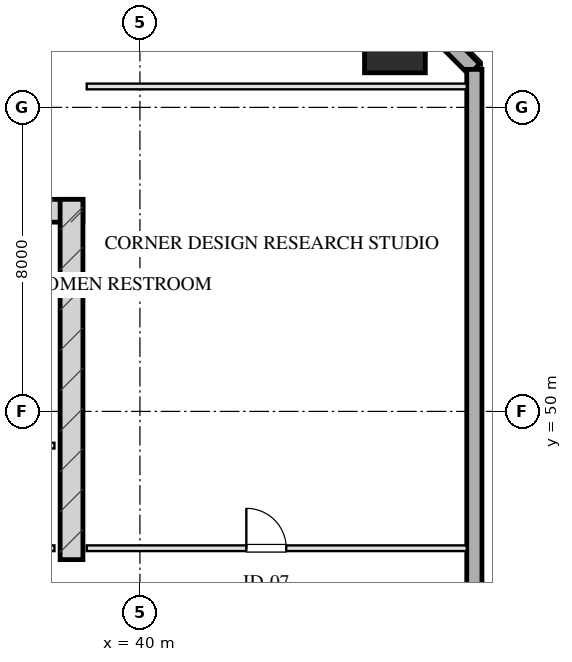
"""IFC4 building model, lengths in metres.
Left out: names, types, materials, properties, quantities, classifications, styles, units other than length and angle.
Written with IfcOpenShell. Run it as: python <this file> out.ifc"""

import sys

from ifc_helpers import new_model, si_unit, direction, frame, frame_2d, origin, origin_2d, place, context, subcontext, project, spatial, rectangle, hollow_rectangle, extrude, element, fill, save


model = new_model("IFC4")
c1 = context("Model", 3, precision=1e-05, world=origin(), true_north=direction((0.0, 1.0)))
c2 = subcontext(c1, "Body", "Model", "MODEL_VIEW")
j1 = project(units=[si_unit("LENGTHUNIT", "METRE"), si_unit("PLANEANGLEUNIT", "RADIAN")], contexts=[c1])
p1 = place(None, origin())
s1 = spatial("IfcSite", under=j1, at=p1, CompositionType="ELEMENT")
p2 = place(p1, origin())
s2 = spatial("IfcBuilding", under=s1, at=p2, CompositionType="ELEMENT")
p3 = place(p2, frame((0.0, 0.0, 134.55)))
s3 = spatial("IfcBuildingStorey", under=s2, at=p3, CompositionType="ELEMENT", Elevation=134.55)
p4 = place(p3, frame((21.5, 55.28, 0.0), z_axis=(0.0, 0.0, 1.0), x_axis=(1.0, 0.0, 0.0)))
e1 = element("IfcWall", 1, at=p4, inside=s3, PredefinedType="SHEAR", context=c2, shape_type="SweptSolid", body=[
    extrude(rectangle(XDim=17.0, YDim=0.6, at=frame_2d((8.5, 0.0))), origin(), (0.0, 0.0, 1.0), 3.45),
])
p5 = place(p3, frame((38.2, 46.1, 0.0), z_axis=(0.0, 0.0, 1.0), x_axis=(0.0, 1.0, 0.0)))
e2 = element("IfcWall", 2, at=p5, inside=s3, PredefinedType="SHEAR", context=c2, shape_type="SweptSolid", body=[
    extrude(rectangle(XDim=9.48, YDim=0.6, at=frame_2d((4.74, 0.0))), origin(), (0.0, 0.0, 1.0), 3.45),
])
p6 = place(p3, frame((46.71, 59.71, 0.0), z_axis=(0.0, 0.0, 1.0), x_axis=(1.0, 0.0, 0.0)))
e3 = element("IfcColumn", 3, at=p6, inside=s3, PredefinedType="COLUMN", context=c2, shape_type="SweptSolid", body=[
    extrude(hollow_rectangle(XDim=1.6, YDim=1.6, WallThickness=0.055, at=origin_2d()), origin(), (0.0, 0.0, 1.0), 3.451),
])
p7 = place(p3, frame((46.0, 61.8, 0.0), z_axis=(0.0, 0.0, 1.0), x_axis=(0.707106781187, -0.707106781187, 0.0)))
e4 = element("IfcWall", 4, at=p7, inside=s3, PredefinedType="SOLIDWALL", context=c2, shape_type="SweptSolid", body=[
    extrude(rectangle(XDim=3.96, YDim=0.4, at=frame_2d((1.98, 0.0))), origin(), (0.0, 0.0, 1.0), 2.55),
])
p8 = place(p3, frame((48.8, 59.0, 0.0), z_axis=(0.0, 0.0, 1.0), x_axis=(0.0, -1.0, 0.0)))
e5 = element("IfcWall", 5, at=p8, inside=s3, PredefinedType="SOLIDWALL", context=c2, shape_type="SweptSolid", body=[
    extrude(rectangle(XDim=50.0, YDim=0.4, at=frame_2d((25.0, 0.0))), origin(), (0.0, 0.0, 1.0), 2.55),
])
p9 = place(p8, frame((21.436, 0.0, 0.0)))
e6 = element("IfcOpeningElement", 6, at=p9, cuts=e5, PredefinedType="OPENING", context=c2, shape_type="SweptSolid", body=[
    extrude(rectangle(XDim=1.1, YDim=2.15, at=frame_2d((0.55, 1.075))), frame((0.0, 0.21, 0.0), z_axis=(0.0, -1.0, 0.0), x_axis=(1.0, 0.0, 0.0)), (0.0, 0.0, 1.0), 0.42),
])
p10 = place(p3, frame((33.95, 46.4, 0.0), z_axis=(0.0, 0.0, 1.0), x_axis=(1.0, 0.0, 0.0)))
e7 = element("IfcWall", 7, at=p10, inside=s3, PredefinedType="PARTITIONING", context=c2, shape_type="SweptSolid", body=[
    extrude(rectangle(XDim=3.8, YDim=0.15, at=frame_2d((1.9, 0.0))), origin(), (0.0, 0.0, 1.0), 3.155),
])
p11 = place(p10, frame((0.45, 0.0, 0.0)))
e8 = element("IfcOpeningElement", 8, at=p11, cuts=e7, PredefinedType="OPENING", context=c2, shape_type="SweptSolid", body=[
    extrude(rectangle(XDim=0.95, YDim=2.05, at=frame_2d((0.475, 1.025))), frame((0.0, 0.085, 0.0), z_axis=(0.0, -1.0, 0.0), x_axis=(1.0, 0.0, 0.0)), (0.0, 0.0, 1.0), 0.17),
])
p12 = place(p3, frame((33.95, 49.1, 0.0), z_axis=(0.0, 0.0, 1.0), x_axis=(1.0, 0.0, 0.0)))
e9 = element("IfcWall", 9, at=p12, inside=s3, PredefinedType="PARTITIONING", context=c2, shape_type="SweptSolid", body=[
    extrude(rectangle(XDim=3.8, YDim=0.15, at=frame_2d((1.9, 0.0))), origin(), (0.0, 0.0, 1.0), 3.155),
])
p13 = place(p12, frame((0.35, 0.0, 0.0)))
e10 = element("IfcOpeningElement", 10, at=p13, cuts=e9, PredefinedType="OPENING", context=c2, shape_type="SweptSolid", body=[
    extrude(rectangle(XDim=0.9, YDim=2.05, at=frame_2d((0.45, 1.025))), frame((0.0, 0.085, 0.0), z_axis=(0.0, -1.0, 0.0), x_axis=(1.0, 0.0, 0.0)), (0.0, 0.0, 1.0), 0.17),
])
p14 = place(p12, frame((2.1, 0.0, 0.0)))
e11 = element("IfcOpeningElement", 11, at=p14, cuts=e9, PredefinedType="OPENING", context=c2, shape_type="SweptSolid", body=[
    extrude(rectangle(XDim=0.9, YDim=2.05, at=frame_2d((0.45, 1.025))), frame((0.0, 0.085, 0.0), z_axis=(0.0, -1.0, 0.0), x_axis=(1.0, 0.0, 0.0)), (0.0, 0.0, 1.0), 0.17),
])
p15 = place(p3, frame((38.6, 58.55, 0.0), z_axis=(0.0, 0.0, 1.0), x_axis=(1.0, 0.0, 0.0)))
e12 = element("IfcWall", 12, at=p15, inside=s3, PredefinedType="PARTITIONING", context=c2, shape_type="SweptSolid", body=[
    extrude(rectangle(XDim=10.0, YDim=0.15, at=frame_2d((5.0, 0.0))), origin(), (0.0, 0.0, 1.0), 3.155),
])
p16 = place(p3, frame((38.6, 46.4, 0.0), z_axis=(0.0, 0.0, 1.0), x_axis=(1.0, 0.0, 0.0)))
e13 = element("IfcWall", 13, at=p16, inside=s3, PredefinedType="PARTITIONING", context=c2, shape_type="SweptSolid", body=[
    extrude(rectangle(XDim=10.0, YDim=0.15, at=frame_2d((5.0, 0.0))), origin(), (0.0, 0.0, 1.0), 3.155),
])
p17 = place(p16, frame((4.2, 0.0, 0.0)))
e14 = element("IfcOpeningElement", 14, at=p17, cuts=e13, PredefinedType="OPENING", context=c2, shape_type="SweptSolid", body=[
    extrude(rectangle(XDim=1.05, YDim=2.05, at=frame_2d((0.525, 1.025))), frame((0.0, 0.085, 0.0), z_axis=(0.0, -1.0, 0.0), x_axis=(1.0, 0.0, 0.0)), (0.0, 0.0, 1.0), 0.17),
])
p18 = place(p17, origin())
e15 = element("IfcDoor", 15, at=p18, inside=s3, OperationType="SINGLE_SWING_LEFT", PredefinedType="DOOR", context=c2, shape_type="SweptSolid", body=[
    extrude(rectangle(XDim=1.05, YDim=2.05, at=frame_2d((0.525, 1.025))), frame((0.0, 0.025, 0.0), z_axis=(0.0, -1.0, 0.0), x_axis=(1.0, 0.0, 0.0)), (0.0, 0.0, 1.0), 0.05),
])
fill(e14, e15)
save(model, sys.argv[1])
